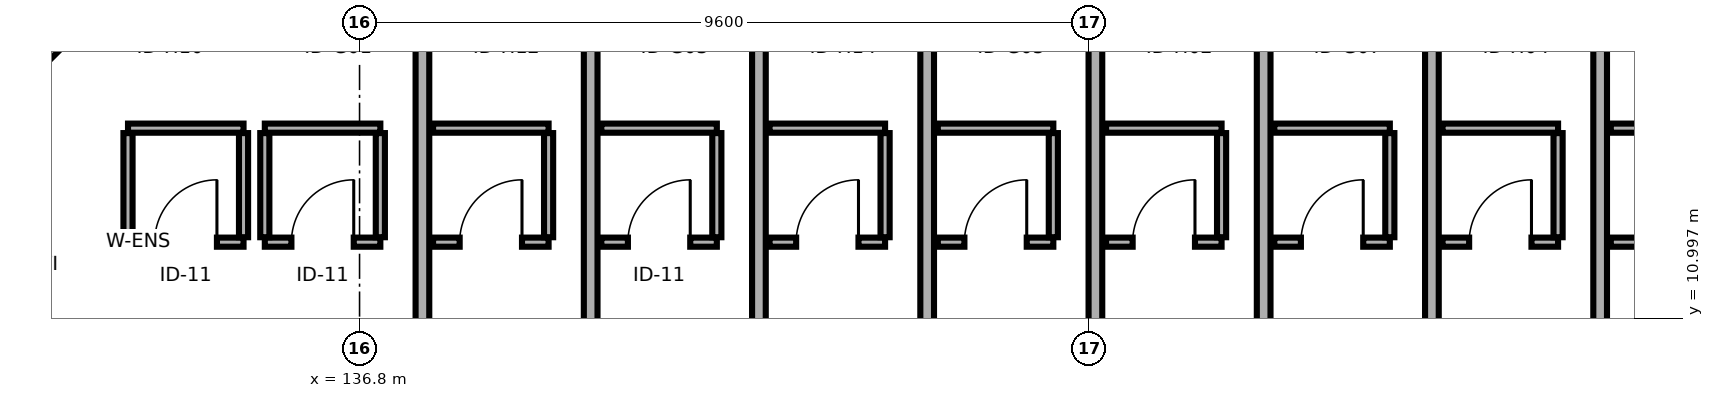
"""IFC4 building model, lengths in metres.
Left out: names, types, materials, properties, quantities, classifications, styles, units other than length and angle.
Written with IfcOpenShell. Run it as: python <this file> out.ifc"""

import sys

from ifc_helpers import new_model, si_unit, direction, frame, frame_2d, origin, place, context, subcontext, project, spatial, rectangle, extrude, element, fill, save


model = new_model("IFC4")
c1 = context("Model", 3, precision=1e-05, world=origin(), true_north=direction((0.0, 1.0)))
c2 = subcontext(c1, "Body", "Model", "MODEL_VIEW")
j1 = project(units=[si_unit("LENGTHUNIT", "METRE"), si_unit("PLANEANGLEUNIT", "RADIAN")], contexts=[c1])
p1 = place(None, origin())
s1 = spatial("IfcSite", under=j1, at=p1, CompositionType="ELEMENT")
p2 = place(p1, origin())
s2 = spatial("IfcBuilding", under=s1, at=p2, CompositionType="ELEMENT")
p3 = place(p2, frame((0.0, 0.0, 28.3)))
s3 = spatial("IfcBuildingStorey", under=s2, at=p3, CompositionType="ELEMENT", Elevation=28.3)
p4 = place(p3, frame((133.754, 12.0, 0.0), z_axis=(0.0, 0.0, 1.0), x_axis=(1.0, 0.0, 0.0)))
e1 = element("IfcWall", 1, at=p4, inside=s3, PredefinedType="PARTITIONING", context=c2, shape_type="SweptSolid", body=[
    extrude(rectangle(XDim=1.52, YDim=0.12, at=frame_2d((0.76, 0.0))), origin(), (0.0, 0.0, 1.0), 2.71),
])
p5 = place(p4, frame((0.35, 0.0, 0.0)))
e2 = element("IfcOpeningElement", 2, at=p5, cuts=e1, PredefinedType="OPENING", context=c2, shape_type="SweptSolid", body=[
    extrude(rectangle(XDim=0.82, YDim=2.08, at=frame_2d((0.41, 1.04))), frame((0.0, 0.07, 0.0), z_axis=(0.0, -1.0, 0.0), x_axis=(1.0, 0.0, 0.0)), (0.0, 0.0, 1.0), 0.14),
])
p6 = place(p3, frame((133.754, 13.5, 0.0), z_axis=(0.0, 0.0, 1.0), x_axis=(1.0, 0.0, 0.0)))
e3 = element("IfcWall", 3, at=p6, inside=s3, PredefinedType="PARTITIONING", context=c2, shape_type="SweptSolid", body=[
    extrude(rectangle(XDim=1.52, YDim=0.12, at=frame_2d((0.76, 0.0))), origin(), (0.0, 0.0, 1.0), 3.175),
])
p7 = place(p3, frame((133.754, 12.065, 0.0), z_axis=(0.0, 0.0, 1.0), x_axis=(0.0, 1.0, 0.0)))
e4 = element("IfcWall", 4, at=p7, inside=s3, PredefinedType="PARTITIONING", context=c2, shape_type="SweptSolid", body=[
    extrude(rectangle(XDim=1.37, YDim=0.12, at=frame_2d((0.685, 0.0))), origin(), (0.0, 0.0, 1.0), 3.175),
])
p8 = place(p3, frame((135.274, 12.065, 0.0), z_axis=(0.0, 0.0, 1.0), x_axis=(0.0, 1.0, 0.0)))
e5 = element("IfcWall", 5, at=p8, inside=s3, PredefinedType="PARTITIONING", context=c2, shape_type="SweptSolid", body=[
    extrude(rectangle(XDim=1.37, YDim=0.12, at=frame_2d((0.685, 0.0))), origin(), (0.0, 0.0, 1.0), 2.71),
])
p9 = place(p3, frame((133.2, 15.0, 0.0), z_axis=(0.0, 0.0, 1.0), x_axis=(-0.707082692656, -0.707130868897, 0.0)))
e6 = element("IfcWall", 6, at=p9, inside=s3, PredefinedType="PARTITIONING", context=c2, shape_type="SweptSolid", body=[
    extrude(rectangle(XDim=5.068, YDim=0.18, at=frame_2d((2.534, 0.0))), origin(), (0.0, 0.0, 1.0), 2.66),
])
p10 = place(p3, frame((135.554, 12.0, 0.0), z_axis=(0.0, 0.0, 1.0), x_axis=(1.0, 0.0, 0.0)))
e7 = element("IfcWall", 7, at=p10, inside=s3, PredefinedType="PARTITIONING", context=c2, shape_type="SweptSolid", body=[
    extrude(rectangle(XDim=1.52, YDim=0.12, at=frame_2d((0.76, 0.0))), origin(), (0.0, 0.0, 1.0), 3.175),
])
p11 = place(p10, frame((0.35, 0.0, 0.0)))
e8 = element("IfcOpeningElement", 8, at=p11, cuts=e7, PredefinedType="OPENING", context=c2, shape_type="SweptSolid", body=[
    extrude(rectangle(XDim=0.82, YDim=2.08, at=frame_2d((0.41, 1.04))), frame((0.0, 0.07, 0.0), z_axis=(0.0, -1.0, 0.0), x_axis=(1.0, 0.0, 0.0)), (0.0, 0.0, 1.0), 0.14),
])
p12 = place(p3, frame((135.554, 13.5, 0.0), z_axis=(0.0, 0.0, 1.0), x_axis=(1.0, 0.0, 0.0)))
e9 = element("IfcWall", 9, at=p12, inside=s3, PredefinedType="PARTITIONING", context=c2, shape_type="SweptSolid", body=[
    extrude(rectangle(XDim=1.52, YDim=0.12, at=frame_2d((0.76, 0.0))), origin(), (0.0, 0.0, 1.0), 2.71),
])
p13 = place(p3, frame((135.554, 12.065, 0.0), z_axis=(0.0, 0.0, 1.0), x_axis=(0.0, 1.0, 0.0)))
e10 = element("IfcWall", 10, at=p13, inside=s3, PredefinedType="PARTITIONING", context=c2, shape_type="SweptSolid", body=[
    extrude(rectangle(XDim=1.37, YDim=0.12, at=frame_2d((0.685, 0.0))), origin(), (0.0, 0.0, 1.0), 2.71),
])
p14 = place(p3, frame((137.073, 12.065, 0.0), z_axis=(0.0, 0.0, 1.0), x_axis=(0.0, 1.0, 0.0)))
e11 = element("IfcWall", 11, at=p14, inside=s3, PredefinedType="PARTITIONING", context=c2, shape_type="SweptSolid", body=[
    extrude(rectangle(XDim=1.37, YDim=0.12, at=frame_2d((0.685, 0.0))), origin(), (0.0, 0.0, 1.0), 3.175),
])
p15 = place(p3, frame((137.627, 7.035, 0.0), z_axis=(0.0, 0.0, 1.0), x_axis=(0.0, 1.0, 0.0)))
e12 = element("IfcWall", 12, at=p15, inside=s3, PredefinedType="PARTITIONING", context=c2, shape_type="SweptSolid", body=[
    extrude(rectangle(XDim=7.965, YDim=0.18, at=frame_2d((3.982, 0.0))), origin(), (0.0, 0.0, 1.0), 2.66),
])
p16 = place(p3, frame((137.767, 12.0, 0.0), z_axis=(0.0, 0.0, 1.0), x_axis=(1.0, 0.0, 0.0)))
e13 = element("IfcWall", 13, at=p16, inside=s3, PredefinedType="PARTITIONING", context=c2, shape_type="SweptSolid", body=[
    extrude(rectangle(XDim=1.52, YDim=0.12, at=frame_2d((0.76, 0.0))), origin(), (0.0, 0.0, 1.0), 3.175),
])
p17 = place(p16, frame((0.35, 0.0, 0.0)))
e14 = element("IfcOpeningElement", 14, at=p17, cuts=e13, PredefinedType="OPENING", context=c2, shape_type="SweptSolid", body=[
    extrude(rectangle(XDim=0.82, YDim=2.08, at=frame_2d((0.41, 1.04))), frame((0.0, 0.07, 0.0), z_axis=(0.0, -1.0, 0.0), x_axis=(1.0, 0.0, 0.0)), (0.0, 0.0, 1.0), 0.14),
])
p18 = place(p3, frame((137.767, 13.5, 0.0), z_axis=(0.0, 0.0, 1.0), x_axis=(1.0, 0.0, 0.0)))
e15 = element("IfcWall", 15, at=p18, inside=s3, PredefinedType="PARTITIONING", context=c2, shape_type="SweptSolid", body=[
    extrude(rectangle(XDim=1.52, YDim=0.12, at=frame_2d((0.76, 0.0))), origin(), (0.0, 0.0, 1.0), 3.175),
])
p19 = place(p3, frame((139.287, 12.065, 0.0), z_axis=(0.0, 0.0, 1.0), x_axis=(0.0, 1.0, 0.0)))
e16 = element("IfcWall", 16, at=p19, inside=s3, PredefinedType="PARTITIONING", context=c2, shape_type="SweptSolid", body=[
    extrude(rectangle(XDim=1.37, YDim=0.12, at=frame_2d((0.685, 0.0))), origin(), (0.0, 0.0, 1.0), 3.175),
])
p20 = place(p3, frame((139.841, 6.645, 0.0), z_axis=(0.0, 0.0, 1.0), x_axis=(0.0, 1.0, 0.0)))
e17 = element("IfcWall", 17, at=p20, inside=s3, PredefinedType="PARTITIONING", context=c2, shape_type="SweptSolid", body=[
    extrude(rectangle(XDim=8.355, YDim=0.18, at=frame_2d((4.178, 0.0))), origin(), (0.0, 0.0, 1.0), 2.66),
])
p21 = place(p3, frame((139.981, 12.0, 0.0), z_axis=(0.0, 0.0, 1.0), x_axis=(1.0, 0.0, 0.0)))
e18 = element("IfcWall", 18, at=p21, inside=s3, PredefinedType="PARTITIONING", context=c2, shape_type="SweptSolid", body=[
    extrude(rectangle(XDim=1.52, YDim=0.12, at=frame_2d((0.76, 0.0))), origin(), (0.0, 0.0, 1.0), 2.71),
])
p22 = place(p21, frame((0.35, 0.0, 0.0)))
e19 = element("IfcOpeningElement", 19, at=p22, cuts=e18, PredefinedType="OPENING", context=c2, shape_type="SweptSolid", body=[
    extrude(rectangle(XDim=0.82, YDim=2.08, at=frame_2d((0.41, 1.04))), frame((0.0, 0.07, 0.0), z_axis=(0.0, -1.0, 0.0), x_axis=(1.0, 0.0, 0.0)), (0.0, 0.0, 1.0), 0.14),
])
p23 = place(p3, frame((139.981, 13.5, 0.0), z_axis=(0.0, 0.0, 1.0), x_axis=(1.0, 0.0, 0.0)))
e20 = element("IfcWall", 20, at=p23, inside=s3, PredefinedType="PARTITIONING", context=c2, shape_type="SweptSolid", body=[
    extrude(rectangle(XDim=1.52, YDim=0.12, at=frame_2d((0.76, 0.0))), origin(), (0.0, 0.0, 1.0), 2.71),
])
p24 = place(p3, frame((141.501, 12.065, 0.0), z_axis=(0.0, 0.0, 1.0), x_axis=(0.0, 1.0, 0.0)))
e21 = element("IfcWall", 21, at=p24, inside=s3, PredefinedType="PARTITIONING", context=c2, shape_type="SweptSolid", body=[
    extrude(rectangle(XDim=1.37, YDim=0.12, at=frame_2d((0.685, 0.0))), origin(), (0.0, 0.0, 1.0), 2.71),
])
p25 = place(p3, frame((142.054, 6.436, 0.0), z_axis=(0.0, 0.0, 1.0), x_axis=(0.0, 1.0, 0.0)))
e22 = element("IfcWall", 22, at=p25, inside=s3, PredefinedType="PARTITIONING", context=c2, shape_type="SweptSolid", body=[
    extrude(rectangle(XDim=8.564, YDim=0.18, at=frame_2d((4.282, 0.0))), origin(), (0.0, 0.0, 1.0), 2.66),
])
p26 = place(p3, frame((142.195, 12.0, 0.0), z_axis=(0.0, 0.0, 1.0), x_axis=(1.0, 0.0, 0.0)))
e23 = element("IfcWall", 23, at=p26, inside=s3, PredefinedType="PARTITIONING", context=c2, shape_type="SweptSolid", body=[
    extrude(rectangle(XDim=1.52, YDim=0.12, at=frame_2d((0.76, 0.0))), origin(), (0.0, 0.0, 1.0), 3.175),
])
p27 = place(p26, frame((0.35, 0.0, 0.0)))
e24 = element("IfcOpeningElement", 24, at=p27, cuts=e23, PredefinedType="OPENING", context=c2, shape_type="SweptSolid", body=[
    extrude(rectangle(XDim=0.82, YDim=2.08, at=frame_2d((0.41, 1.04))), frame((0.0, 0.07, 0.0), z_axis=(0.0, -1.0, 0.0), x_axis=(1.0, 0.0, 0.0)), (0.0, 0.0, 1.0), 0.14),
])
p28 = place(p3, frame((142.195, 13.5, 0.0), z_axis=(0.0, 0.0, 1.0), x_axis=(1.0, 0.0, 0.0)))
e25 = element("IfcWall", 25, at=p28, inside=s3, PredefinedType="PARTITIONING", context=c2, shape_type="SweptSolid", body=[
    extrude(rectangle(XDim=1.52, YDim=0.12, at=frame_2d((0.76, 0.0))), origin(), (0.0, 0.0, 1.0), 3.175),
])
p29 = place(p3, frame((143.715, 12.065, 0.0), z_axis=(0.0, 0.0, 1.0), x_axis=(0.0, 1.0, 0.0)))
e26 = element("IfcWall", 26, at=p29, inside=s3, PredefinedType="PARTITIONING", context=c2, shape_type="SweptSolid", body=[
    extrude(rectangle(XDim=1.37, YDim=0.12, at=frame_2d((0.685, 0.0))), origin(), (0.0, 0.0, 1.0), 3.175),
])
p30 = place(p3, frame((144.268, 6.436, 0.0), z_axis=(0.0, 0.0, 1.0), x_axis=(0.0, 1.0, 0.0)))
e27 = element("IfcWall", 27, at=p30, inside=s3, PredefinedType="PARTITIONING", context=c2, shape_type="SweptSolid", body=[
    extrude(rectangle(XDim=8.564, YDim=0.18, at=frame_2d((4.282, 0.0))), origin(), (0.0, 0.0, 1.0), 2.66),
])
p31 = place(p3, frame((144.408, 12.0, 0.0), z_axis=(0.0, 0.0, 1.0), x_axis=(1.0, 0.0, 0.0)))
e28 = element("IfcWall", 28, at=p31, inside=s3, PredefinedType="PARTITIONING", context=c2, shape_type="SweptSolid", body=[
    extrude(rectangle(XDim=1.52, YDim=0.12, at=frame_2d((0.76, 0.0))), origin(), (0.0, 0.0, 1.0), 3.175),
])
p32 = place(p31, frame((0.35, 0.0, 0.0)))
e29 = element("IfcOpeningElement", 29, at=p32, cuts=e28, PredefinedType="OPENING", context=c2, shape_type="SweptSolid", body=[
    extrude(rectangle(XDim=0.82, YDim=2.08, at=frame_2d((0.41, 1.04))), frame((0.0, 0.07, 0.0), z_axis=(0.0, -1.0, 0.0), x_axis=(1.0, 0.0, 0.0)), (0.0, 0.0, 1.0), 0.14),
])
p33 = place(p3, frame((144.408, 13.5, 0.0), z_axis=(0.0, 0.0, 1.0), x_axis=(1.0, 0.0, 0.0)))
e30 = element("IfcWall", 30, at=p33, inside=s3, PredefinedType="PARTITIONING", context=c2, shape_type="SweptSolid", body=[
    extrude(rectangle(XDim=1.52, YDim=0.12, at=frame_2d((0.76, 0.0))), origin(), (0.0, 0.0, 1.0), 3.175),
])
p34 = place(p3, frame((145.928, 12.065, 0.0), z_axis=(0.0, 0.0, 1.0), x_axis=(0.0, 1.0, 0.0)))
e31 = element("IfcWall", 31, at=p34, inside=s3, PredefinedType="PARTITIONING", context=c2, shape_type="SweptSolid", body=[
    extrude(rectangle(XDim=1.37, YDim=0.12, at=frame_2d((0.685, 0.0))), origin(), (0.0, 0.0, 1.0), 3.175),
])
p35 = place(p3, frame((146.482, 6.436, 0.0), z_axis=(0.0, 0.0, 1.0), x_axis=(0.0, 1.0, 0.0)))
e32 = element("IfcWall", 32, at=p35, inside=s3, PredefinedType="PARTITIONING", context=c2, shape_type="SweptSolid", body=[
    extrude(rectangle(XDim=8.564, YDim=0.18, at=frame_2d((4.282, 0.0))), origin(), (0.0, 0.0, 1.0), 2.66),
])
p36 = place(p3, frame((146.622, 12.0, 0.0), z_axis=(0.0, 0.0, 1.0), x_axis=(1.0, 0.0, 0.0)))
e33 = element("IfcWall", 33, at=p36, inside=s3, PredefinedType="PARTITIONING", context=c2, shape_type="SweptSolid", body=[
    extrude(rectangle(XDim=1.52, YDim=0.12, at=frame_2d((0.76, 0.0))), origin(), (0.0, 0.0, 1.0), 3.175),
])
p37 = place(p36, frame((0.35, 0.0, 0.0)))
e34 = element("IfcOpeningElement", 34, at=p37, cuts=e33, PredefinedType="OPENING", context=c2, shape_type="SweptSolid", body=[
    extrude(rectangle(XDim=0.82, YDim=2.08, at=frame_2d((0.41, 1.04))), frame((0.0, 0.07, 0.0), z_axis=(0.0, -1.0, 0.0), x_axis=(1.0, 0.0, 0.0)), (0.0, 0.0, 1.0), 0.14),
])
p38 = place(p3, frame((146.622, 13.5, 0.0), z_axis=(0.0, 0.0, 1.0), x_axis=(1.0, 0.0, 0.0)))
e35 = element("IfcWall", 35, at=p38, inside=s3, PredefinedType="PARTITIONING", context=c2, shape_type="SweptSolid", body=[
    extrude(rectangle(XDim=1.52, YDim=0.12, at=frame_2d((0.76, 0.0))), origin(), (0.0, 0.0, 1.0), 3.175),
])
p39 = place(p3, frame((148.142, 12.065, 0.0), z_axis=(0.0, 0.0, 1.0), x_axis=(0.0, 1.0, 0.0)))
e36 = element("IfcWall", 36, at=p39, inside=s3, PredefinedType="PARTITIONING", context=c2, shape_type="SweptSolid", body=[
    extrude(rectangle(XDim=1.37, YDim=0.12, at=frame_2d((0.685, 0.0))), origin(), (0.0, 0.0, 1.0), 3.175),
])
p40 = place(p3, frame((148.696, 6.461, 0.0), z_axis=(0.0, 0.0, 1.0), x_axis=(0.0, 1.0, 0.0)))
e37 = element("IfcWall", 37, at=p40, inside=s3, PredefinedType="PARTITIONING", context=c2, shape_type="SweptSolid", body=[
    extrude(rectangle(XDim=8.539, YDim=0.18, at=frame_2d((4.27, 0.0))), origin(), (0.0, 0.0, 1.0), 2.66),
])
p41 = place(p3, frame((148.835, 12.0, 0.0), z_axis=(0.0, 0.0, 1.0), x_axis=(1.0, 0.0, 0.0)))
e38 = element("IfcWall", 38, at=p41, inside=s3, PredefinedType="PARTITIONING", context=c2, shape_type="SweptSolid", body=[
    extrude(rectangle(XDim=1.52, YDim=0.12, at=frame_2d((0.76, 0.0))), origin(), (0.0, 0.0, 1.0), 2.71),
])
p42 = place(p41, frame((0.35, 0.0, 0.0)))
e39 = element("IfcOpeningElement", 39, at=p42, cuts=e38, PredefinedType="OPENING", context=c2, shape_type="SweptSolid", body=[
    extrude(rectangle(XDim=0.82, YDim=2.08, at=frame_2d((0.41, 1.04))), frame((0.0, 0.07, 0.0), z_axis=(0.0, -1.0, 0.0), x_axis=(1.0, 0.0, 0.0)), (0.0, 0.0, 1.0), 0.14),
])
p43 = place(p3, frame((148.835, 13.5, 0.0), z_axis=(0.0, 0.0, 1.0), x_axis=(1.0, 0.0, 0.0)))
e40 = element("IfcWall", 40, at=p43, inside=s3, PredefinedType="PARTITIONING", context=c2, shape_type="SweptSolid", body=[
    extrude(rectangle(XDim=1.52, YDim=0.12, at=frame_2d((0.76, 0.0))), origin(), (0.0, 0.0, 1.0), 2.71),
])
p44 = place(p3, frame((150.355, 12.065, 0.0), z_axis=(0.0, 0.0, 1.0), x_axis=(0.0, 1.0, 0.0)))
e41 = element("IfcWall", 41, at=p44, inside=s3, PredefinedType="PARTITIONING", context=c2, shape_type="SweptSolid", body=[
    extrude(rectangle(XDim=1.37, YDim=0.12, at=frame_2d((0.685, 0.0))), origin(), (0.0, 0.0, 1.0), 3.175),
])
p45 = place(p3, frame((150.909, 6.679, 0.0), z_axis=(0.0, 0.0, 1.0), x_axis=(0.0, 1.0, 0.0)))
e42 = element("IfcWall", 42, at=p45, inside=s3, PredefinedType="PARTITIONING", context=c2, shape_type="SweptSolid", body=[
    extrude(rectangle(XDim=8.321, YDim=0.18, at=frame_2d((4.16, 0.0))), origin(), (0.0, 0.0, 1.0), 2.66),
])
p46 = place(p3, frame((151.049, 12.0, 0.0), z_axis=(0.0, 0.0, 1.0), x_axis=(1.0, 0.0, 0.0)))
e43 = element("IfcWall", 43, at=p46, inside=s3, PredefinedType="PARTITIONING", context=c2, shape_type="SweptSolid", body=[
    extrude(rectangle(XDim=1.52, YDim=0.12, at=frame_2d((0.76, 0.0))), origin(), (0.0, 0.0, 1.0), 3.175),
])
p47 = place(p46, frame((0.35, 0.0, 0.0)))
e44 = element("IfcOpeningElement", 44, at=p47, cuts=e43, PredefinedType="OPENING", context=c2, shape_type="SweptSolid", body=[
    extrude(rectangle(XDim=0.82, YDim=2.08, at=frame_2d((0.41, 1.04))), frame((0.0, 0.07, 0.0), z_axis=(0.0, -1.0, 0.0), x_axis=(1.0, 0.0, 0.0)), (0.0, 0.0, 1.0), 0.14),
])
p48 = place(p3, frame((151.049, 13.5, 0.0), z_axis=(0.0, 0.0, 1.0), x_axis=(1.0, 0.0, 0.0)))
e45 = element("IfcWall", 45, at=p48, inside=s3, PredefinedType="PARTITIONING", context=c2, shape_type="SweptSolid", body=[
    extrude(rectangle(XDim=1.52, YDim=0.12, at=frame_2d((0.76, 0.0))), origin(), (0.0, 0.0, 1.0), 3.175),
])
p49 = place(p3, frame((152.569, 12.065, 0.0), z_axis=(0.0, 0.0, 1.0), x_axis=(0.0, 1.0, 0.0)))
e46 = element("IfcWall", 46, at=p49, inside=s3, PredefinedType="PARTITIONING", context=c2, shape_type="SweptSolid", body=[
    extrude(rectangle(XDim=1.37, YDim=0.12, at=frame_2d((0.685, 0.0))), origin(), (0.0, 0.0, 1.0), 3.175),
])
p50 = place(p3, frame((153.123, 7.141, 0.0), z_axis=(0.0, 0.0, 1.0), x_axis=(0.0, 1.0, 0.0)))
e47 = element("IfcWall", 47, at=p50, inside=s3, PredefinedType="PARTITIONING", context=c2, shape_type="SweptSolid", body=[
    extrude(rectangle(XDim=7.859, YDim=0.18, at=frame_2d((3.929, 0.0))), origin(), (0.0, 0.0, 1.0), 2.66),
])
p51 = place(p3, frame((153.263, 12.0, 0.0), z_axis=(0.0, 0.0, 1.0), x_axis=(1.0, 0.0, 0.0)))
e48 = element("IfcWall", 48, at=p51, inside=s3, PredefinedType="PARTITIONING", context=c2, shape_type="SweptSolid", body=[
    extrude(rectangle(XDim=1.52, YDim=0.12, at=frame_2d((0.76, 0.0))), origin(), (0.0, 0.0, 1.0), 3.175),
])
p52 = place(p51, frame((0.35, 0.0, 0.0)))
e49 = element("IfcOpeningElement", 49, at=p52, cuts=e48, PredefinedType="OPENING", context=c2, shape_type="SweptSolid", body=[
    extrude(rectangle(XDim=0.82, YDim=2.08, at=frame_2d((0.41, 1.04))), frame((0.0, 0.07, 0.0), z_axis=(0.0, -1.0, 0.0), x_axis=(1.0, 0.0, 0.0)), (0.0, 0.0, 1.0), 0.14),
])
p53 = place(p3, frame((153.263, 13.5, 0.0), z_axis=(0.0, 0.0, 1.0), x_axis=(1.0, 0.0, 0.0)))
e50 = element("IfcWall", 50, at=p53, inside=s3, PredefinedType="PARTITIONING", context=c2, shape_type="SweptSolid", body=[
    extrude(rectangle(XDim=1.52, YDim=0.12, at=frame_2d((0.76, 0.0))), origin(), (0.0, 0.0, 1.0), 3.175),
])
p54 = place(p5, origin())
e51 = element("IfcDoor", 51, at=p54, inside=s3, OperationType="SINGLE_SWING_RIGHT", PredefinedType="DOOR", context=c2, shape_type="SweptSolid", body=[
    extrude(rectangle(XDim=0.82, YDim=2.08, at=frame_2d((0.41, 1.04))), frame((0.0, 0.025, 0.0), z_axis=(0.0, -1.0, 0.0), x_axis=(1.0, 0.0, 0.0)), (0.0, 0.0, 1.0), 0.05),
])
fill(e2, e51)
p55 = place(p11, origin())
e52 = element("IfcDoor", 52, at=p55, inside=s3, OperationType="SINGLE_SWING_RIGHT", PredefinedType="DOOR", context=c2, shape_type="SweptSolid", body=[
    extrude(rectangle(XDim=0.82, YDim=2.08, at=frame_2d((0.41, 1.04))), frame((0.0, 0.025, 0.0), z_axis=(0.0, -1.0, 0.0), x_axis=(1.0, 0.0, 0.0)), (0.0, 0.0, 1.0), 0.05),
])
fill(e8, e52)
p56 = place(p17, origin())
e53 = element("IfcDoor", 53, at=p56, inside=s3, OperationType="SINGLE_SWING_RIGHT", PredefinedType="DOOR", context=c2, shape_type="SweptSolid", body=[
    extrude(rectangle(XDim=0.82, YDim=2.08, at=frame_2d((0.41, 1.04))), frame((0.0, 0.025, 0.0), z_axis=(0.0, -1.0, 0.0), x_axis=(1.0, 0.0, 0.0)), (0.0, 0.0, 1.0), 0.05),
])
fill(e14, e53)
p57 = place(p22, origin())
e54 = element("IfcDoor", 54, at=p57, inside=s3, OperationType="SINGLE_SWING_RIGHT", PredefinedType="DOOR", context=c2, shape_type="SweptSolid", body=[
    extrude(rectangle(XDim=0.82, YDim=2.08, at=frame_2d((0.41, 1.04))), frame((0.0, 0.025, 0.0), z_axis=(0.0, -1.0, 0.0), x_axis=(1.0, 0.0, 0.0)), (0.0, 0.0, 1.0), 0.05),
])
fill(e19, e54)
p58 = place(p27, origin())
e55 = element("IfcDoor", 55, at=p58, inside=s3, OperationType="SINGLE_SWING_RIGHT", PredefinedType="DOOR", context=c2, shape_type="SweptSolid", body=[
    extrude(rectangle(XDim=0.82, YDim=2.08, at=frame_2d((0.41, 1.04))), frame((0.0, 0.025, 0.0), z_axis=(0.0, -1.0, 0.0), x_axis=(1.0, 0.0, 0.0)), (0.0, 0.0, 1.0), 0.05),
])
fill(e24, e55)
p59 = place(p32, origin())
e56 = element("IfcDoor", 56, at=p59, inside=s3, OperationType="SINGLE_SWING_RIGHT", PredefinedType="DOOR", context=c2, shape_type="SweptSolid", body=[
    extrude(rectangle(XDim=0.82, YDim=2.08, at=frame_2d((0.41, 1.04))), frame((0.0, 0.025, 0.0), z_axis=(0.0, -1.0, 0.0), x_axis=(1.0, 0.0, 0.0)), (0.0, 0.0, 1.0), 0.05),
])
fill(e29, e56)
p60 = place(p37, origin())
e57 = element("IfcDoor", 57, at=p60, inside=s3, OperationType="SINGLE_SWING_RIGHT", PredefinedType="DOOR", context=c2, shape_type="SweptSolid", body=[
    extrude(rectangle(XDim=0.82, YDim=2.08, at=frame_2d((0.41, 1.04))), frame((0.0, 0.025, 0.0), z_axis=(0.0, -1.0, 0.0), x_axis=(1.0, 0.0, 0.0)), (0.0, 0.0, 1.0), 0.05),
])
fill(e34, e57)
p61 = place(p42, origin())
e58 = element("IfcDoor", 58, at=p61, inside=s3, OperationType="SINGLE_SWING_RIGHT", PredefinedType="DOOR", context=c2, shape_type="SweptSolid", body=[
    extrude(rectangle(XDim=0.82, YDim=2.08, at=frame_2d((0.41, 1.04))), frame((0.0, 0.025, 0.0), z_axis=(0.0, -1.0, 0.0), x_axis=(1.0, 0.0, 0.0)), (0.0, 0.0, 1.0), 0.05),
])
fill(e39, e58)
p62 = place(p47, origin())
e59 = element("IfcDoor", 59, at=p62, inside=s3, OperationType="SINGLE_SWING_RIGHT", PredefinedType="DOOR", context=c2, shape_type="SweptSolid", body=[
    extrude(rectangle(XDim=0.82, YDim=2.08, at=frame_2d((0.41, 1.04))), frame((0.0, 0.025, 0.0), z_axis=(0.0, -1.0, 0.0), x_axis=(1.0, 0.0, 0.0)), (0.0, 0.0, 1.0), 0.05),
])
fill(e44, e59)
save(model, sys.argv[1])
